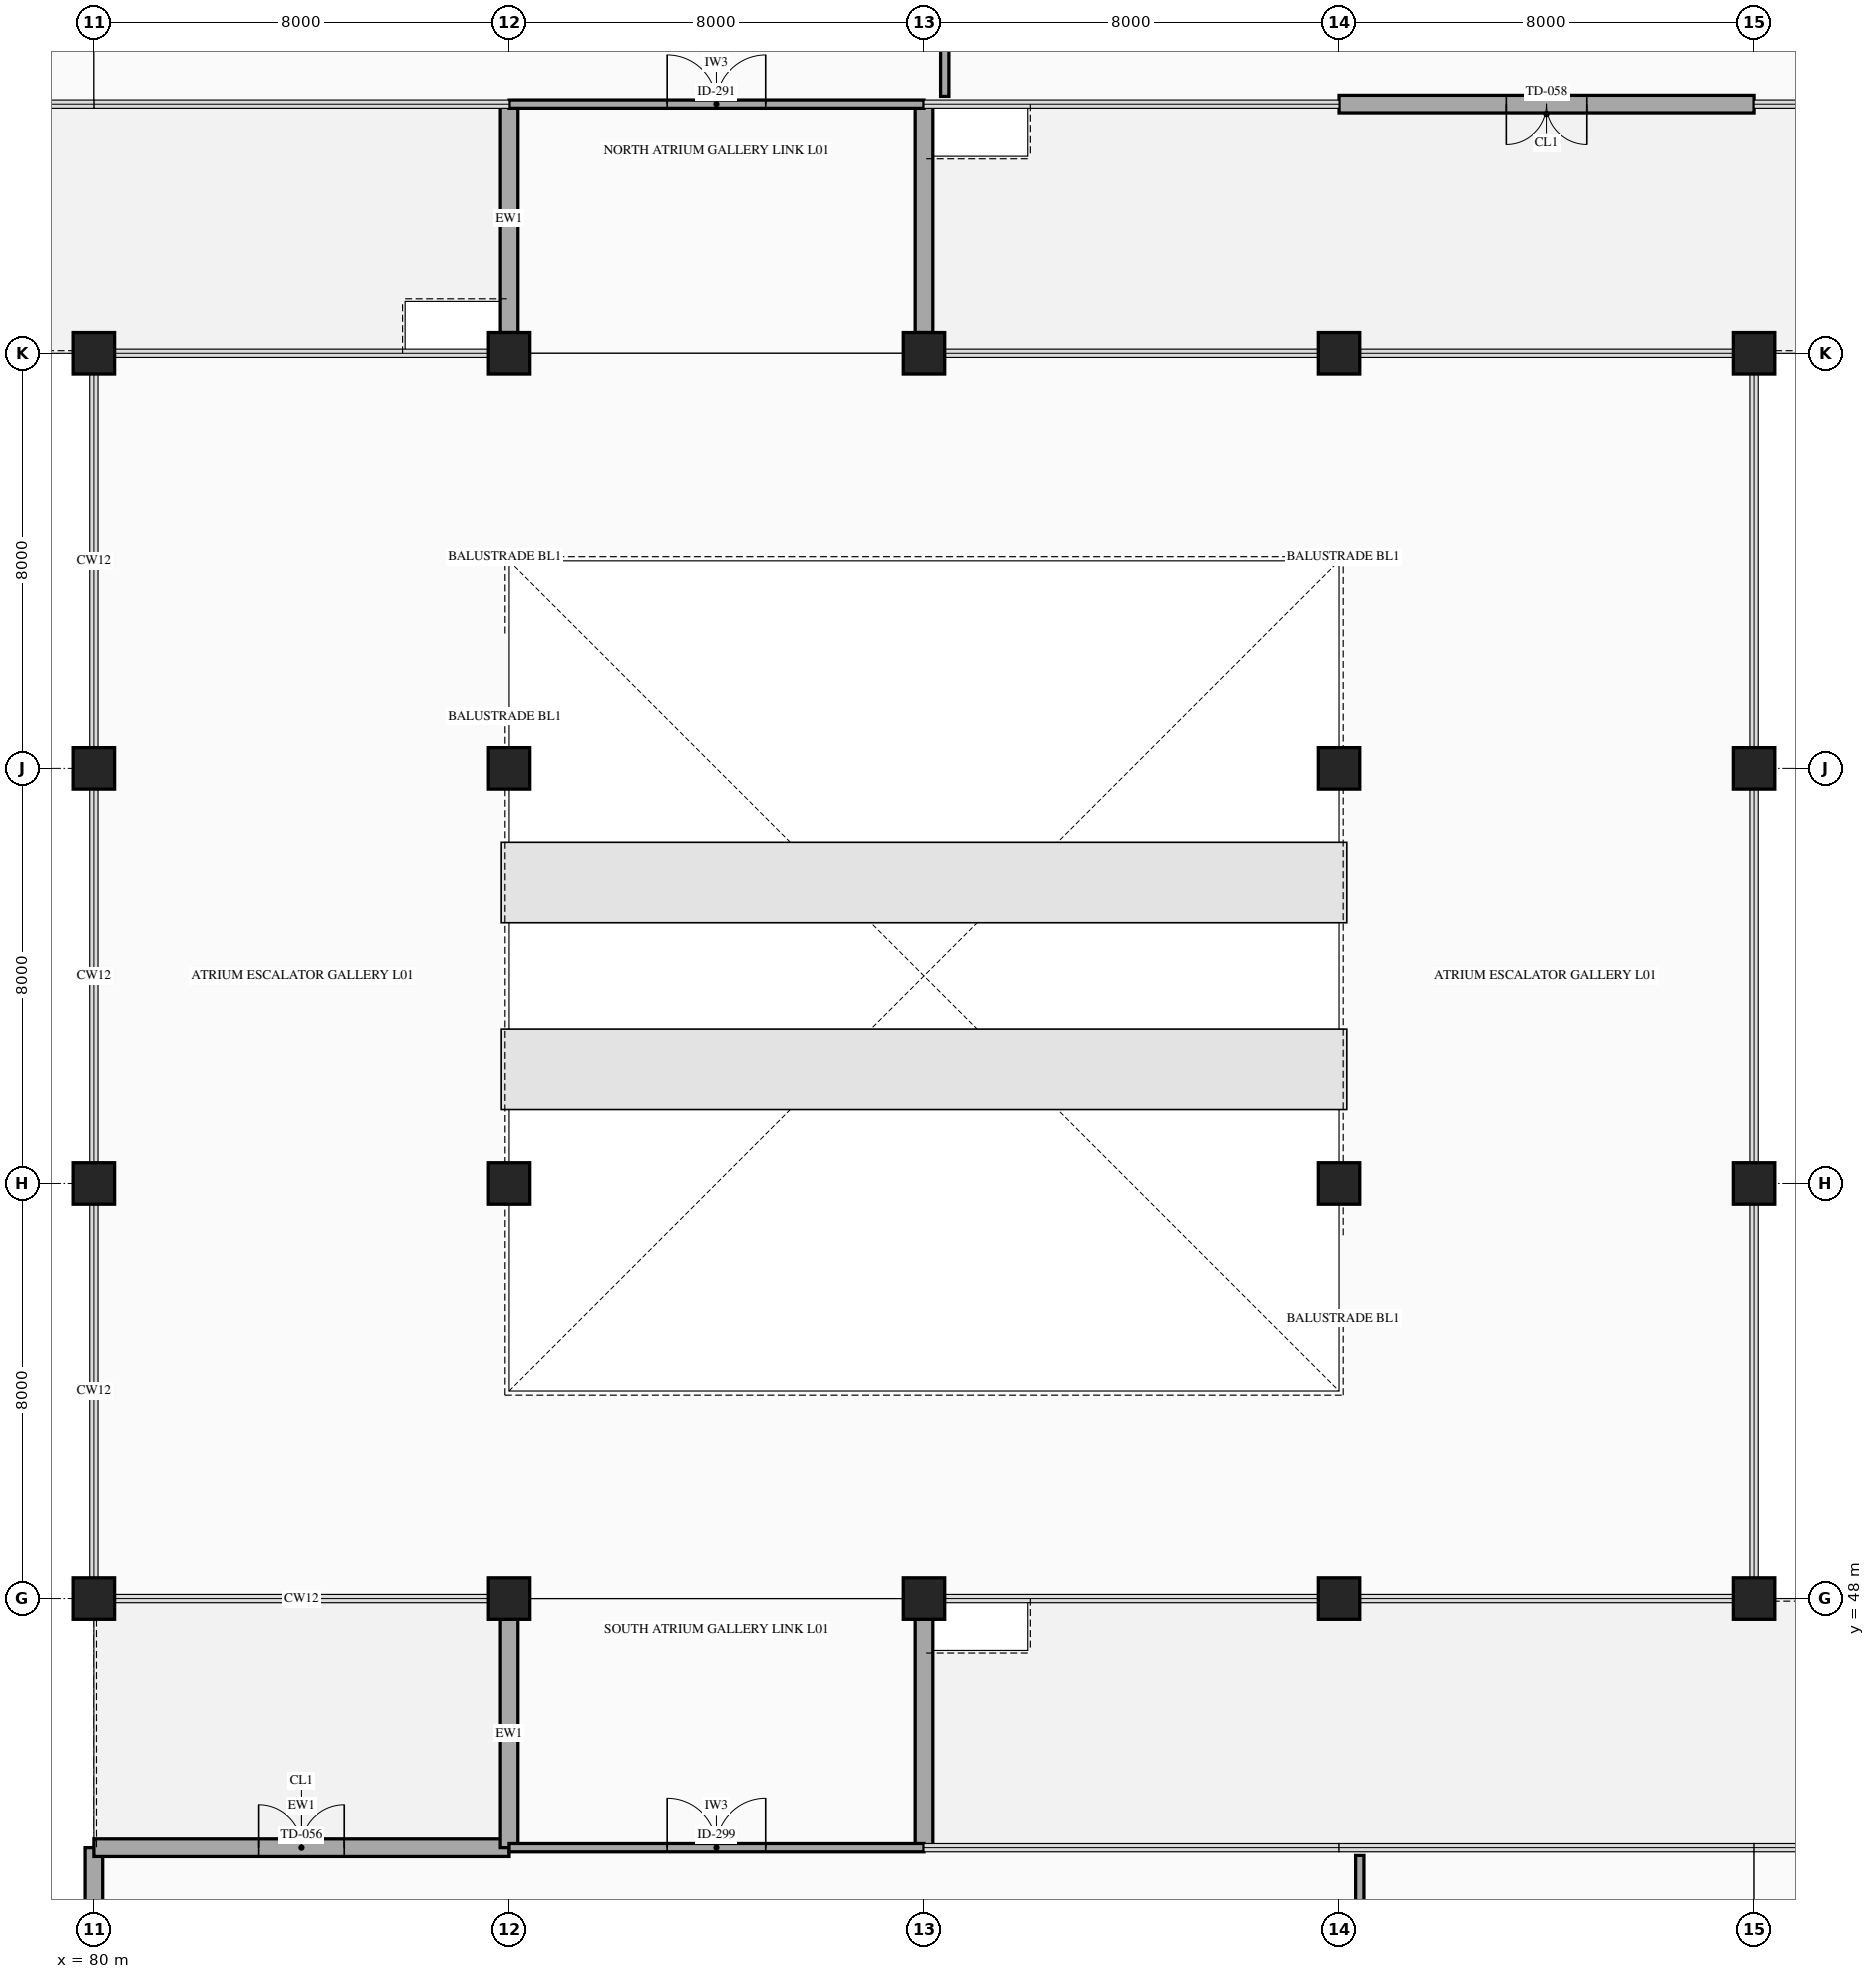
"""IFC4 building model, lengths in metres.
Left out: names, types, materials, properties, quantities, classifications, styles, units other than length and angle.
Written with IfcOpenShell. Run it as: python <this file> out.ifc"""

import sys

from ifc_helpers import new_model, si_unit, direction, frame, frame_2d, origin, origin_2d, place, context, subcontext, project, spatial, rectangle, circle, extrude, element, fill, save


model = new_model("IFC4")
c1 = context("Model", 3, precision=1e-05, world=origin(), true_north=direction((0.0, 1.0)))
c2 = subcontext(c1, "Body", "Model", "MODEL_VIEW")
j1 = project(units=[si_unit("LENGTHUNIT", "METRE"), si_unit("PLANEANGLEUNIT", "RADIAN")], contexts=[c1])
p1 = place(None, origin())
s1 = spatial("IfcSite", under=j1, at=p1, CompositionType="ELEMENT")
p2 = place(p1, origin())
s2 = spatial("IfcBuilding", under=s1, at=p2, CompositionType="ELEMENT")
p3 = place(p2, frame((0.0, 0.0, 5.6)))
s3 = spatial("IfcBuildingStorey", under=s2, at=p3, CompositionType="ELEMENT", Elevation=5.6)
p4 = place(p3, frame((80.0, 48.0, 0.0), z_axis=(0.0, 0.0, 1.0), x_axis=(1.0, 0.0, 0.0)))
e1 = element("IfcColumn", 1, at=p4, inside=s3, PredefinedType="COLUMN", context=c2, shape_type="SweptSolid", body=[
    extrude(circle(Radius=0.4, at=origin_2d()), origin(), (0.0, 0.0, 1.0), 4.8),
])
p5 = place(p3, frame((80.0, 56.0, 0.0), z_axis=(0.0, 0.0, 1.0), x_axis=(1.0, 0.0, 0.0)))
e2 = element("IfcColumn", 2, at=p5, inside=s3, PredefinedType="COLUMN", context=c2, shape_type="SweptSolid", body=[
    extrude(rectangle(XDim=0.8, YDim=0.8, at=origin_2d()), origin(), (0.0, 0.0, 1.0), 4.8),
])
p6 = place(p3, frame((80.0, 64.0, 0.0), z_axis=(0.0, 0.0, 1.0), x_axis=(1.0, 0.0, 0.0)))
e3 = element("IfcColumn", 3, at=p6, inside=s3, PredefinedType="COLUMN", context=c2, shape_type="SweptSolid", body=[
    extrude(circle(Radius=0.4, at=origin_2d()), origin(), (0.0, 0.0, 1.0), 4.8),
])
for number, where, z_axis, x_axis in (
    (4, (80.0, 72.0, 0.0), (0.0, 0.0, 1.0), (1.0, 0.0, 0.0)),
    (5, (88.0, 48.0, 0.0), (0.0, 0.0, 1.0), (1.0, 0.0, 0.0)),
):
    element("IfcColumn", number, at=place(p3, frame(where, z_axis=z_axis, x_axis=x_axis)), inside=s3, PredefinedType="COLUMN", context=c2, shape_type="SweptSolid", body=[
        extrude(rectangle(XDim=0.8, YDim=0.8, at=origin_2d()), origin(), (0.0, 0.0, 1.0), 4.8),
    ])
p7 = place(p3, frame((88.0, 56.0, 0.0), z_axis=(0.0, 0.0, 1.0), x_axis=(1.0, 0.0, 0.0)))
e6 = element("IfcColumn", 6, at=p7, inside=s3, PredefinedType="COLUMN", context=c2, shape_type="SweptSolid", body=[
    extrude(circle(Radius=0.4, at=origin_2d()), origin(), (0.0, 0.0, 1.0), 4.8),
])
p8 = place(p3, frame((88.0, 64.0, 0.0), z_axis=(0.0, 0.0, 1.0), x_axis=(1.0, 0.0, 0.0)))
e7 = element("IfcColumn", 7, at=p8, inside=s3, PredefinedType="COLUMN", context=c2, shape_type="SweptSolid", body=[
    extrude(rectangle(XDim=0.8, YDim=0.8, at=origin_2d()), origin(), (0.0, 0.0, 1.0), 4.8),
])
for number, where, z_axis, x_axis in (
    (8, (88.0, 72.0, 0.0), (0.0, 0.0, 1.0), (1.0, 0.0, 0.0)),
    (9, (96.0, 48.0, 0.0), (0.0, 0.0, 1.0), (1.0, 0.0, 0.0)),
):
    element("IfcColumn", number, at=place(p3, frame(where, z_axis=z_axis, x_axis=x_axis)), inside=s3, PredefinedType="COLUMN", context=c2, shape_type="SweptSolid", body=[
        extrude(circle(Radius=0.4, at=origin_2d()), origin(), (0.0, 0.0, 1.0), 4.8),
    ])
for number, where, z_axis, x_axis in (
    (10, (96.0, 72.0, 0.0), (0.0, 0.0, 1.0), (1.0, 0.0, 0.0)),
    (11, (104.0, 48.0, 0.0), (0.0, 0.0, 1.0), (1.0, 0.0, 0.0)),
):
    element("IfcColumn", number, at=place(p3, frame(where, z_axis=z_axis, x_axis=x_axis)), inside=s3, PredefinedType="COLUMN", context=c2, shape_type="SweptSolid", body=[
        extrude(rectangle(XDim=0.8, YDim=0.8, at=origin_2d()), origin(), (0.0, 0.0, 1.0), 4.8),
    ])
p9 = place(p3, frame((104.0, 56.0, 0.0), z_axis=(0.0, 0.0, 1.0), x_axis=(1.0, 0.0, 0.0)))
e12 = element("IfcColumn", 12, at=p9, inside=s3, PredefinedType="COLUMN", context=c2, shape_type="SweptSolid", body=[
    extrude(circle(Radius=0.4, at=origin_2d()), origin(), (0.0, 0.0, 1.0), 4.8),
])
p10 = place(p3, frame((104.0, 64.0, 0.0), z_axis=(0.0, 0.0, 1.0), x_axis=(1.0, 0.0, 0.0)))
e13 = element("IfcColumn", 13, at=p10, inside=s3, PredefinedType="COLUMN", context=c2, shape_type="SweptSolid", body=[
    extrude(rectangle(XDim=0.8, YDim=0.8, at=origin_2d()), origin(), (0.0, 0.0, 1.0), 4.8),
])
for number, where, z_axis, x_axis in (
    (14, (104.0, 72.0, 0.0), (0.0, 0.0, 1.0), (1.0, 0.0, 0.0)),
    (15, (112.0, 48.0, 0.0), (0.0, 0.0, 1.0), (1.0, 0.0, 0.0)),
):
    element("IfcColumn", number, at=place(p3, frame(where, z_axis=z_axis, x_axis=x_axis)), inside=s3, PredefinedType="COLUMN", context=c2, shape_type="SweptSolid", body=[
        extrude(circle(Radius=0.4, at=origin_2d()), origin(), (0.0, 0.0, 1.0), 4.8),
    ])
p11 = place(p3, frame((112.0, 56.0, 0.0), z_axis=(0.0, 0.0, 1.0), x_axis=(1.0, 0.0, 0.0)))
e16 = element("IfcColumn", 16, at=p11, inside=s3, PredefinedType="COLUMN", context=c2, shape_type="SweptSolid", body=[
    extrude(rectangle(XDim=0.8, YDim=0.8, at=origin_2d()), origin(), (0.0, 0.0, 1.0), 4.8),
])
p12 = place(p3, frame((112.0, 64.0, 0.0), z_axis=(0.0, 0.0, 1.0), x_axis=(1.0, 0.0, 0.0)))
e17 = element("IfcColumn", 17, at=p12, inside=s3, PredefinedType="COLUMN", context=c2, shape_type="SweptSolid", body=[
    extrude(circle(Radius=0.4, at=origin_2d()), origin(), (0.0, 0.0, 1.0), 4.8),
])
p13 = place(p3, frame((112.0, 72.0, 0.0), z_axis=(0.0, 0.0, 1.0), x_axis=(1.0, 0.0, 0.0)))
e18 = element("IfcColumn", 18, at=p13, inside=s3, PredefinedType="COLUMN", context=c2, shape_type="SweptSolid", body=[
    extrude(rectangle(XDim=0.8, YDim=0.8, at=origin_2d()), origin(), (0.0, 0.0, 1.0), 4.8),
])
p14 = place(p3, frame((80.0, 40.178, 0.0), z_axis=(0.0, 0.0, 1.0), x_axis=(0.0, 1.0, 0.0)))
e19 = element("IfcWall", 19, at=p14, inside=s3, PredefinedType="STANDARD", context=c2, shape_type="SweptSolid", body=[
    extrude(rectangle(XDim=3.022, YDim=0.34, at=frame_2d((1.511, 0.0))), origin(), (0.0, 0.0, 1.0), 3.78),
])
p15 = place(p3, frame((80.0, 43.2, 0.0), z_axis=(0.0, 0.0, 1.0), x_axis=(1.0, 0.0, 0.0)))
e20 = element("IfcWall", 20, at=p15, inside=s3, PredefinedType="STANDARD", context=c2, shape_type="SweptSolid", body=[
    extrude(rectangle(XDim=8.0, YDim=0.34, at=frame_2d((4.0, 0.0))), origin(), (0.0, 0.0, 1.0), 3.78),
])
p16 = place(p15, frame((3.175, 0.0, 0.0)))
e21 = element("IfcOpeningElement", 21, at=p16, cuts=e20, PredefinedType="OPENING", context=c2, shape_type="SweptSolid", body=[
    extrude(rectangle(XDim=1.65, YDim=2.2, at=frame_2d((0.825, 1.1))), frame((0.0, 0.18, 0.0), z_axis=(0.0, -1.0, 0.0), x_axis=(1.0, 0.0, 0.0)), (0.0, 0.0, 1.0), 0.36),
])
for number, where, z_axis, x_axis in (
    (22, (88.0, 43.2, 0.0), (0.0, 0.0, 1.0), (0.0, 1.0, 0.0)),
    (23, (88.0, 72.4, 0.0), (0.0, 0.0, 1.0), (0.0, 1.0, 0.0)),
):
    element("IfcWall", number, at=place(p3, frame(where, z_axis=z_axis, x_axis=x_axis)), inside=s3, PredefinedType="STANDARD", context=c2, shape_type="SweptSolid", body=[
        extrude(rectangle(XDim=4.4, YDim=0.34, at=frame_2d((2.2, 0.0))), origin(), (0.0, 0.0, 1.0), 3.78),
    ])
p17 = place(p3, frame((112.0, 76.8, 0.0), z_axis=(0.0, 0.0, 1.0), x_axis=(-1.0, 0.0, 0.0)))
e24 = element("IfcWall", 24, at=p17, inside=s3, PredefinedType="STANDARD", context=c2, shape_type="SweptSolid", body=[
    extrude(rectangle(XDim=8.0, YDim=0.34, at=frame_2d((4.0, 0.0))), origin(), (0.0, 0.0, 1.0), 3.78),
])
p18 = place(p17, frame((3.225, 0.0, 0.0)))
e25 = element("IfcOpeningElement", 25, at=p18, cuts=e24, PredefinedType="OPENING", context=c2, shape_type="SweptSolid", body=[
    extrude(rectangle(XDim=1.55, YDim=2.15, at=frame_2d((0.775, 1.075))), frame((0.0, 0.18, 0.0), z_axis=(0.0, -1.0, 0.0), x_axis=(1.0, 0.0, 0.0)), (0.0, 0.0, 1.0), 0.36),
])
for number, where, z_axis, x_axis in (
    (26, (96.0, 76.8, 0.0), (0.0, 0.0, 1.0), (0.0, -1.0, 0.0)),
    (27, (96.0, 47.6, 0.0), (0.0, 0.0, 1.0), (0.0, -1.0, 0.0)),
):
    element("IfcWall", number, at=place(p3, frame(where, z_axis=z_axis, x_axis=x_axis)), inside=s3, PredefinedType="STANDARD", context=c2, shape_type="SweptSolid", body=[
        extrude(rectangle(XDim=4.4, YDim=0.34, at=frame_2d((2.2, 0.0))), origin(), (0.0, 0.0, 1.0), 3.78),
    ])
p19 = place(p3, frame((96.4, 76.95, 0.0), z_axis=(0.0, 0.0, 1.0), x_axis=(0.0, 1.0, 0.0)))
e28 = element("IfcWall", 28, at=p19, inside=s3, PredefinedType="PARTITIONING", context=c2, shape_type="SweptSolid", body=[
    extrude(rectangle(XDim=23.25, YDim=0.16, at=frame_2d((11.625, 0.0))), origin(), (0.0, 0.0, 1.0), 3.78),
])
p20 = place(p19, frame((14.117, 0.0, 0.0)))
e29 = element("IfcOpeningElement", 29, at=p20, cuts=e28, PredefinedType="OPENING", context=c2, shape_type="SweptSolid", body=[
    extrude(rectangle(XDim=1.9, YDim=2.3, at=frame_2d((0.95, 1.15))), frame((0.0, 0.09, 0.0), z_axis=(0.0, -1.0, 0.0), x_axis=(1.0, 0.0, 0.0)), (0.0, 0.0, 1.0), 0.18),
])
p21 = place(p3, frame((88.0, 76.8, 0.0), z_axis=(0.0, 0.0, 1.0), x_axis=(1.0, 0.0, 0.0)))
e30 = element("IfcWall", 30, at=p21, inside=s3, PredefinedType="PARTITIONING", context=c2, shape_type="SweptSolid", body=[
    extrude(rectangle(XDim=8.0, YDim=0.16, at=frame_2d((4.0, 0.0))), origin(), (0.0, 0.0, 1.0), 3.78),
])
p22 = place(p21, frame((3.05, 0.0, 0.0)))
e31 = element("IfcOpeningElement", 31, at=p22, cuts=e30, PredefinedType="OPENING", context=c2, shape_type="SweptSolid", body=[
    extrude(rectangle(XDim=1.9, YDim=2.3, at=frame_2d((0.95, 1.15))), frame((0.0, 0.09, 0.0), z_axis=(0.0, -1.0, 0.0), x_axis=(1.0, 0.0, 0.0)), (0.0, 0.0, 1.0), 0.18),
])
p23 = place(p3, frame((104.4, 19.2, 0.0), z_axis=(0.0, 0.0, 1.0), x_axis=(0.0, 1.0, 0.0)))
e32 = element("IfcWall", 32, at=p23, inside=s3, PredefinedType="PARTITIONING", context=c2, shape_type="SweptSolid", body=[
    extrude(rectangle(XDim=23.85, YDim=0.16, at=frame_2d((11.925, 0.0))), origin(), (0.0, 0.0, 1.0), 3.78),
])
p24 = place(p23, frame((16.122, 0.0, 0.0)))
e33 = element("IfcOpeningElement", 33, at=p24, cuts=e32, PredefinedType="OPENING", context=c2, shape_type="SweptSolid", body=[
    extrude(rectangle(XDim=1.7, YDim=2.25, at=frame_2d((0.85, 1.125))), frame((0.0, 0.09, 0.0), z_axis=(0.0, -1.0, 0.0), x_axis=(1.0, 0.0, 0.0)), (0.0, 0.0, 1.0), 0.18),
])
p25 = place(p3, frame((88.0, 43.2, 0.0), z_axis=(0.0, 0.0, 1.0), x_axis=(1.0, 0.0, 0.0)))
e34 = element("IfcWall", 34, at=p25, inside=s3, PredefinedType="PARTITIONING", context=c2, shape_type="SweptSolid", body=[
    extrude(rectangle(XDim=8.0, YDim=0.16, at=frame_2d((4.0, 0.0))), origin(), (0.0, 0.0, 1.0), 3.78),
])
p26 = place(p25, frame((3.05, 0.0, 0.0)))
e35 = element("IfcOpeningElement", 35, at=p26, cuts=e34, PredefinedType="OPENING", context=c2, shape_type="SweptSolid", body=[
    extrude(rectangle(XDim=1.9, YDim=2.3, at=frame_2d((0.95, 1.15))), frame((0.0, 0.09, 0.0), z_axis=(0.0, -1.0, 0.0), x_axis=(1.0, 0.0, 0.0)), (0.0, 0.0, 1.0), 0.18),
])
p27 = place(p16, origin())
e36 = element("IfcDoor", 36, at=p27, inside=s3, OperationType="DOUBLE_DOOR_SINGLE_SWING", PredefinedType="DOOR", context=c2, shape_type="SweptSolid", body=[
    extrude(rectangle(XDim=1.65, YDim=2.2, at=frame_2d((0.825, 1.1))), frame((0.0, 0.025, 0.0), z_axis=(0.0, -1.0, 0.0), x_axis=(1.0, 0.0, 0.0)), (0.0, 0.0, 1.0), 0.05),
])
fill(e21, e36)
p28 = place(p18, origin())
e37 = element("IfcDoor", 37, at=p28, inside=s3, OperationType="DOUBLE_DOOR_SINGLE_SWING", PredefinedType="DOOR", context=c2, shape_type="SweptSolid", body=[
    extrude(rectangle(XDim=1.55, YDim=2.15, at=frame_2d((0.775, 1.075))), frame((0.0, 0.025, 0.0), z_axis=(0.0, -1.0, 0.0), x_axis=(1.0, 0.0, 0.0)), (0.0, 0.0, 1.0), 0.05),
])
fill(e25, e37)
p29 = place(p22, origin())
e38 = element("IfcDoor", 38, at=p29, inside=s3, OperationType="DOUBLE_DOOR_SINGLE_SWING", PredefinedType="DOOR", context=c2, shape_type="SweptSolid", body=[
    extrude(rectangle(XDim=1.9, YDim=2.3, at=frame_2d((0.95, 1.15))), frame((0.0, 0.025, 0.0), z_axis=(0.0, -1.0, 0.0), x_axis=(1.0, 0.0, 0.0)), (0.0, 0.0, 1.0), 0.05),
])
fill(e31, e38)
p30 = place(p26, origin())
e39 = element("IfcDoor", 39, at=p30, inside=s3, OperationType="DOUBLE_DOOR_SINGLE_SWING", PredefinedType="DOOR", context=c2, shape_type="SweptSolid", body=[
    extrude(rectangle(XDim=1.9, YDim=2.3, at=frame_2d((0.95, 1.15))), frame((0.0, 0.025, 0.0), z_axis=(0.0, -1.0, 0.0), x_axis=(1.0, 0.0, 0.0)), (0.0, 0.0, 1.0), 0.05),
])
fill(e35, e39)
save(model, sys.argv[1])
